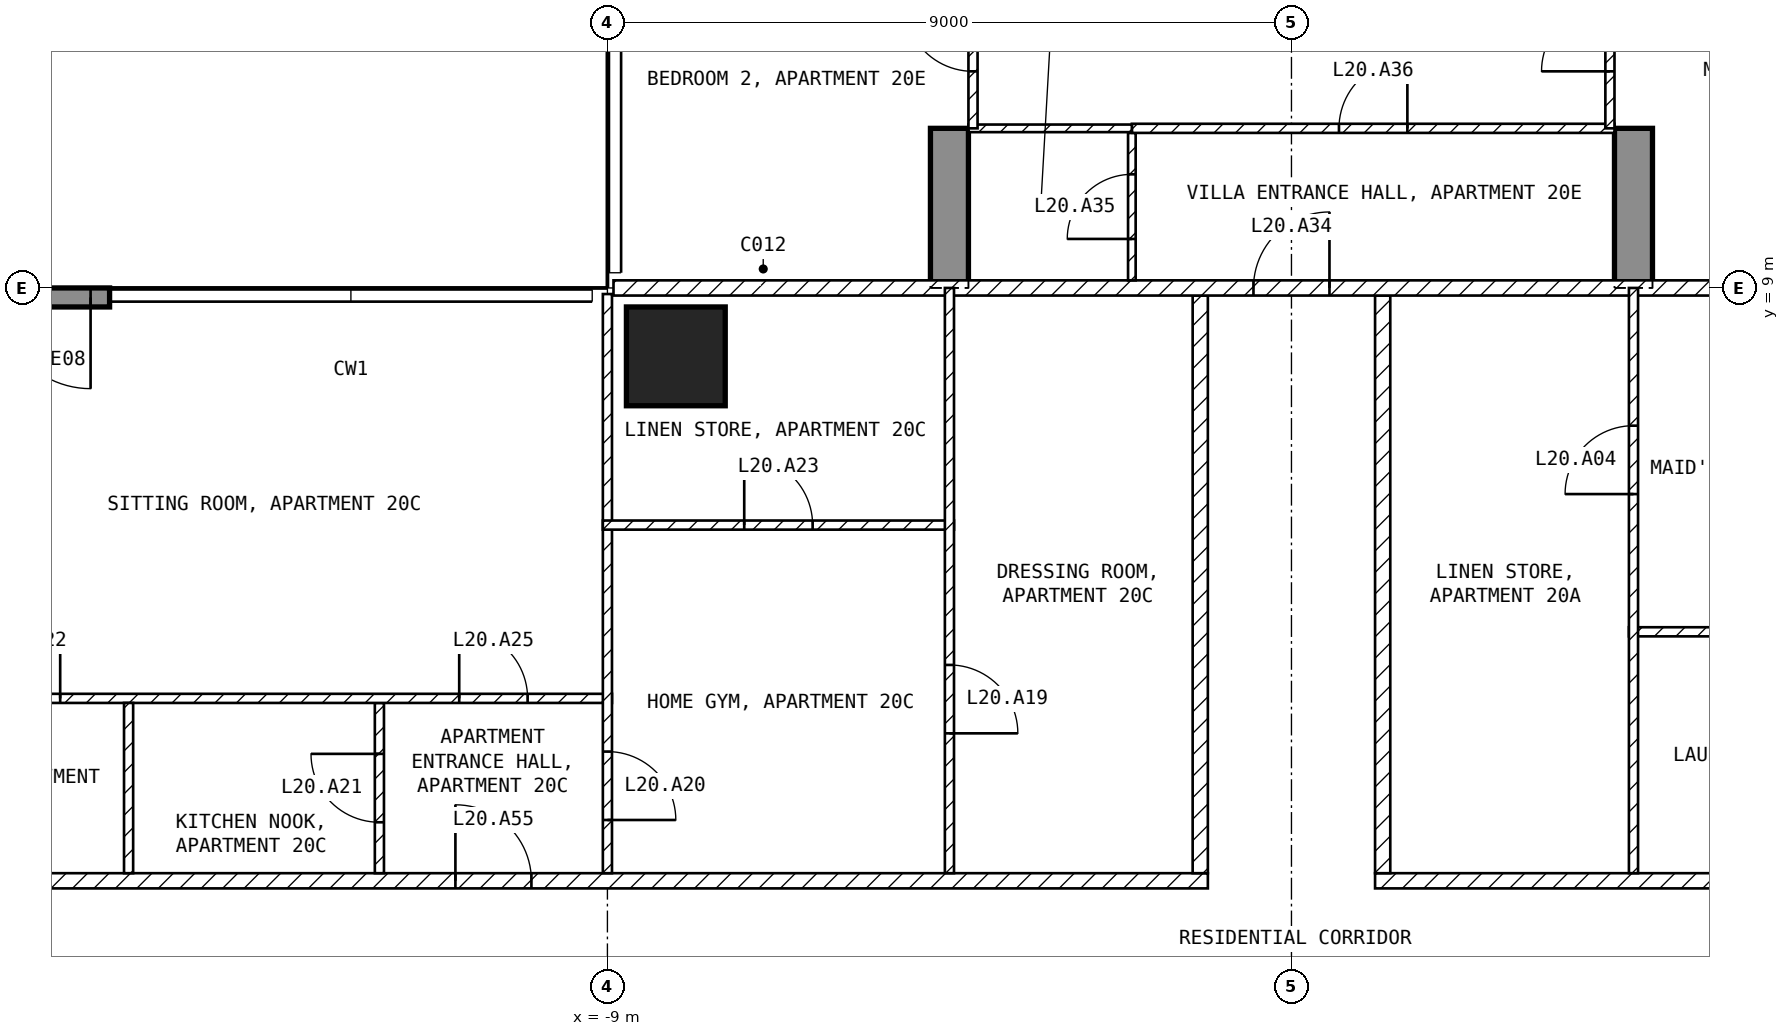
"""IFC4 building model, lengths in metres.
Left out: names, types, materials, properties, quantities, classifications, styles, units other than length and angle.
Written with IfcOpenShell. Run it as: python <this file> out.ifc"""

import sys

from ifc_helpers import new_model, si_unit, direction, frame, frame_2d, origin, origin_2d, place, context, subcontext, project, spatial, polyline, rectangle, outline, extrude, element, fill, save


model = new_model("IFC4")
c1 = context("Model", 3, precision=1e-05, world=origin(), true_north=direction((0.0, 1.0)))
c2 = subcontext(c1, "Body", "Model", "MODEL_VIEW")
j1 = project(units=[si_unit("LENGTHUNIT", "METRE"), si_unit("PLANEANGLEUNIT", "RADIAN")], contexts=[c1])
p1 = place(None, origin())
s1 = spatial("IfcSite", under=j1, at=p1, CompositionType="ELEMENT")
p2 = place(p1, origin())
s2 = spatial("IfcBuilding", under=s1, at=p2, CompositionType="ELEMENT")
p3 = place(p2, frame((0.0, 0.0, 89.0)))
s3 = spatial("IfcBuildingStorey", under=s2, at=p3, CompositionType="ELEMENT", Elevation=89.0)
p4 = place(p3, frame((-8.1, 8.1, -0.25), z_axis=(0.0, 0.0, 1.0), x_axis=(1.0, 0.0, 0.0)))
e1 = element("IfcColumn", 1, at=p4, inside=s3, PredefinedType="COLUMN", context=c2, shape_type="SweptSolid", body=[
    extrude(rectangle(XDim=1.3, YDim=1.3, at=origin_2d()), origin(), (0.0, 0.0, 1.0), 3.45),
])
for number, where, z_axis, x_axis in (
    (2, (-4.75, 9.0, -0.25), (1.0, 0.0, 0.0), (0.0, 1.0, 0.0)),
    (3, (4.25, 9.0, -0.25), (1.0, 0.0, 0.0), (0.0, 1.0, 0.0)),
):
    element("IfcWall", number, at=place(p3, frame(where, z_axis=z_axis, x_axis=x_axis)), inside=s3, PredefinedType="SHEAR", context=c2, shape_type="SweptSolid", body=[
        extrude(outline(polyline([(0.0, 0.0), (2.1, 0.0), (2.1, 2.65), (4.5, 2.65), (4.5, 0.0), (9.9, 0.0), (9.9, 2.65), (12.3, 2.65), (12.3, 0.0), (16.45, 0.0), (16.45, 3.45), (0.0, 3.45), (0.0, 0.0)])), origin(), (0.0, 0.0, 1.0), 0.5),
    ])
p5 = place(p3, frame((-15.55, 8.875, 0.0), z_axis=(0.0, 0.0, 1.0), x_axis=(-1.0, 0.0, 0.0)))
e4 = element("IfcWall", 4, at=p5, inside=s3, PredefinedType="SOLIDWALL", context=c2, shape_type="SweptSolid", body=[
    extrude(rectangle(XDim=2.65, YDim=0.25, at=frame_2d((1.325, 0.0))), origin(), (0.0, 0.0, 1.0), 3.2),
])
p6 = place(p5, frame((0.25, 0.0, 0.0)))
e5 = element("IfcOpeningElement", 5, at=p6, cuts=e4, PredefinedType="OPENING", context=c2, shape_type="SweptSolid", body=[
    extrude(rectangle(XDim=1.2, YDim=2.4, at=frame_2d((0.6, 1.2))), frame((0.0, 0.135, 0.0), z_axis=(0.0, -1.0, 0.0), x_axis=(1.0, 0.0, 0.0)), (0.0, 0.0, 1.0), 0.27),
])
p7 = place(p3, frame((1.1, 1.2, 0.0), z_axis=(0.0, 0.0, 1.0), x_axis=(1.0, 0.0, 0.0)))
e6 = element("IfcWall", 6, at=p7, inside=s3, PredefinedType="PARTITIONING", context=c2, shape_type="SweptSolid", body=[
    extrude(rectangle(XDim=20.5, YDim=0.2, at=frame_2d((10.25, 0.0))), origin(), (0.0, 0.0, 1.0), 3.2),
])
p8 = place(p7, frame((15.2, 0.0, 0.0)))
e7 = element("IfcOpeningElement", 7, at=p8, cuts=e6, PredefinedType="OPENING", context=c2, shape_type="SweptSolid", body=[
    extrude(rectangle(XDim=1.0, YDim=2.1, at=frame_2d((0.5, 1.05))), frame((0.0, 0.11, 0.0), z_axis=(0.0, -1.0, 0.0), x_axis=(1.0, 0.0, 0.0)), (0.0, 0.0, 1.0), 0.22),
])
p9 = place(p3, frame((1.2, 8.9, 0.0), z_axis=(0.0, 0.0, 1.0), x_axis=(0.0, -1.0, 0.0)))
e8 = element("IfcWall", 8, at=p9, inside=s3, PredefinedType="PARTITIONING", context=c2, shape_type="SweptSolid", body=[
    extrude(rectangle(XDim=7.6, YDim=0.2, at=frame_2d((3.8, 0.0))), origin(), (0.0, 0.0, 1.0), 3.2),
])
p10 = place(p3, frame((-21.6, 1.2, 0.0), z_axis=(0.0, 0.0, 1.0), x_axis=(1.0, 0.0, 0.0)))
e9 = element("IfcWall", 9, at=p10, inside=s3, PredefinedType="PARTITIONING", context=c2, shape_type="SweptSolid", body=[
    extrude(rectangle(XDim=20.5, YDim=0.2, at=frame_2d((10.25, 0.0))), origin(), (0.0, 0.0, 1.0), 3.2),
])
p11 = place(p10, frame((10.6, 0.0, 0.0)))
e10 = element("IfcOpeningElement", 10, at=p11, cuts=e9, PredefinedType="OPENING", context=c2, shape_type="SweptSolid", body=[
    extrude(rectangle(XDim=1.0, YDim=2.1, at=frame_2d((0.5, 1.05))), frame((0.0, 0.11, 0.0), z_axis=(0.0, -1.0, 0.0), x_axis=(1.0, 0.0, 0.0)), (0.0, 0.0, 1.0), 0.22),
])
p12 = place(p3, frame((-1.2, 1.3, 0.0), z_axis=(0.0, 0.0, 1.0), x_axis=(0.0, 1.0, 0.0)))
e11 = element("IfcWall", 11, at=p12, inside=s3, PredefinedType="PARTITIONING", context=c2, shape_type="SweptSolid", body=[
    extrude(rectangle(XDim=7.6, YDim=0.2, at=frame_2d((3.8, 0.0))), origin(), (0.0, 0.0, 1.0), 3.2),
])
p13 = place(p3, frame((-8.92, 9.0, 0.0), z_axis=(0.0, 0.0, 1.0), x_axis=(1.0, 0.0, 0.0)))
e12 = element("IfcWall", 12, at=p13, inside=s3, PredefinedType="PARTITIONING", context=c2, shape_type="SweptSolid", body=[
    extrude(rectangle(XDim=17.84, YDim=0.2, at=frame_2d((8.92, 0.0))), origin(), (0.0, 0.0, 1.0), 3.2),
])
p14 = place(p13, frame((8.42, 0.0, 0.0)))
e13 = element("IfcOpeningElement", 13, at=p14, cuts=e12, PredefinedType="OPENING", context=c2, shape_type="SweptSolid", body=[
    extrude(rectangle(XDim=1.0, YDim=2.1, at=frame_2d((0.5, 1.05))), frame((0.0, 0.11, 0.0), z_axis=(0.0, -1.0, 0.0), x_axis=(1.0, 0.0, 0.0)), (0.0, 0.0, 1.0), 0.22),
])
p15 = place(p3, frame((4.44, 4.476, 0.0), z_axis=(0.0, 0.0, 1.0), x_axis=(1.0, 0.0, 0.0)))
e14 = element("IfcWall", 14, at=p15, inside=s3, PredefinedType="PARTITIONING", context=c2, shape_type="SweptSolid", body=[
    extrude(rectangle(XDim=4.61, YDim=0.12, at=frame_2d((2.305, 0.0))), origin(), (0.0, 0.0, 1.0), 3.2),
])
p16 = place(p15, frame((1.86, 0.0, 0.0)))
e15 = element("IfcOpeningElement", 15, at=p16, cuts=e14, PredefinedType="OPENING", context=c2, shape_type="SweptSolid", body=[
    extrude(rectangle(XDim=0.9, YDim=2.1, at=frame_2d((0.45, 1.05))), frame((0.0, 0.07, 0.0), z_axis=(0.0, -1.0, 0.0), x_axis=(1.0, 0.0, 0.0)), (0.0, 0.0, 1.0), 0.14),
])
p17 = place(p3, frame((4.5, 1.3, 0.0), z_axis=(0.0, 0.0, 1.0), x_axis=(0.0, 1.0, 0.0)))
e16 = element("IfcWall", 16, at=p17, inside=s3, PredefinedType="PARTITIONING", context=c2, shape_type="SweptSolid", body=[
    extrude(rectangle(XDim=7.7, YDim=0.12, at=frame_2d((3.85, 0.0))), origin(), (0.0, 0.0, 1.0), 3.2),
])
p18 = place(p17, frame((4.988, 0.0, 0.0)))
e17 = element("IfcOpeningElement", 17, at=p18, cuts=e16, PredefinedType="OPENING", context=c2, shape_type="SweptSolid", body=[
    extrude(rectangle(XDim=0.9, YDim=2.1, at=frame_2d((0.45, 1.05))), frame((0.0, 0.07, 0.0), z_axis=(0.0, -1.0, 0.0), x_axis=(1.0, 0.0, 0.0)), (0.0, 0.0, 1.0), 0.14),
])
p19 = place(p3, frame((-12.0, 1.3, 0.0), z_axis=(0.0, 0.0, 1.0), x_axis=(0.0, 1.0, 0.0)))
e18 = element("IfcWall", 18, at=p19, inside=s3, PredefinedType="PARTITIONING", context=c2, shape_type="SweptSolid", body=[
    extrude(rectangle(XDim=2.24, YDim=0.12, at=frame_2d((1.12, 0.0))), origin(), (0.0, 0.0, 1.0), 3.2),
])
p20 = place(p19, frame((0.67, 0.0, 0.0)))
e19 = element("IfcOpeningElement", 19, at=p20, cuts=e18, PredefinedType="OPENING", context=c2, shape_type="SweptSolid", body=[
    extrude(rectangle(XDim=0.9, YDim=2.1, at=frame_2d((0.45, 1.05))), frame((0.0, 0.07, 0.0), z_axis=(0.0, -1.0, 0.0), x_axis=(1.0, 0.0, 0.0)), (0.0, 0.0, 1.0), 0.14),
])
p21 = place(p3, frame((-18.75, 3.6, 0.0), z_axis=(0.0, 0.0, 1.0), x_axis=(1.0, 0.0, 0.0)))
e20 = element("IfcWall", 20, at=p21, inside=s3, PredefinedType="PARTITIONING", context=c2, shape_type="SweptSolid", body=[
    extrude(rectangle(XDim=9.81, YDim=0.12, at=frame_2d((4.905, 0.0))), origin(), (0.0, 0.0, 1.0), 3.2),
])
p22 = place(p21, frame((1.65, 0.0, 0.0)))
e21 = element("IfcOpeningElement", 21, at=p22, cuts=e20, PredefinedType="OPENING", context=c2, shape_type="SweptSolid", body=[
    extrude(rectangle(XDim=0.9, YDim=2.1, at=frame_2d((0.45, 1.05))), frame((0.0, 0.07, 0.0), z_axis=(0.0, -1.0, 0.0), x_axis=(1.0, 0.0, 0.0)), (0.0, 0.0, 1.0), 0.14),
])
p23 = place(p21, frame((7.8, 0.0, 0.0)))
e22 = element("IfcOpeningElement", 22, at=p23, cuts=e20, PredefinedType="OPENING", context=c2, shape_type="SweptSolid", body=[
    extrude(rectangle(XDim=0.9, YDim=2.1, at=frame_2d((0.45, 1.05))), frame((0.0, 0.07, 0.0), z_axis=(0.0, -1.0, 0.0), x_axis=(1.0, 0.0, 0.0)), (0.0, 0.0, 1.0), 0.14),
])
p24 = place(p3, frame((-9.0, 8.92, 0.0), z_axis=(0.0, 0.0, 1.0), x_axis=(0.0, -1.0, 0.0)))
e23 = element("IfcWall", 23, at=p24, inside=s3, PredefinedType="PARTITIONING", context=c2, shape_type="SweptSolid", body=[
    extrude(rectangle(XDim=7.62, YDim=0.12, at=frame_2d((3.81, 0.0))), origin(), (0.0, 0.0, 1.0), 3.2),
])
p25 = place(p24, frame((6.02, 0.0, 0.0)))
e24 = element("IfcOpeningElement", 24, at=p25, cuts=e23, PredefinedType="OPENING", context=c2, shape_type="SweptSolid", body=[
    extrude(rectangle(XDim=0.9, YDim=2.1, at=frame_2d((0.45, 1.05))), frame((0.0, 0.07, 0.0), z_axis=(0.0, -1.0, 0.0), x_axis=(1.0, 0.0, 0.0)), (0.0, 0.0, 1.0), 0.14),
])
p26 = place(p3, frame((-15.3, 1.3, 0.0), z_axis=(0.0, 0.0, 1.0), x_axis=(0.0, 1.0, 0.0)))
e25 = element("IfcWall", 25, at=p26, inside=s3, PredefinedType="PARTITIONING", context=c2, shape_type="SweptSolid", body=[
    extrude(rectangle(XDim=2.24, YDim=0.12, at=frame_2d((1.12, 0.0))), origin(), (0.0, 0.0, 1.0), 3.2),
])
p27 = place(p3, frame((-9.06, 5.88, 0.0), z_axis=(0.0, 0.0, 1.0), x_axis=(1.0, 0.0, 0.0)))
e26 = element("IfcWall", 26, at=p27, inside=s3, PredefinedType="PARTITIONING", context=c2, shape_type="SweptSolid", body=[
    extrude(rectangle(XDim=4.62, YDim=0.12, at=frame_2d((2.31, 0.0))), origin(), (0.0, 0.0, 1.0), 3.2),
])
p28 = place(p27, frame((1.86, 0.0, 0.0)))
e27 = element("IfcOpeningElement", 27, at=p28, cuts=e26, PredefinedType="OPENING", context=c2, shape_type="SweptSolid", body=[
    extrude(rectangle(XDim=0.9, YDim=2.1, at=frame_2d((0.45, 1.05))), frame((0.0, 0.07, 0.0), z_axis=(0.0, -1.0, 0.0), x_axis=(1.0, 0.0, 0.0)), (0.0, 0.0, 1.0), 0.14),
])
p29 = place(p3, frame((-4.5, 9.0, 0.0), z_axis=(0.0, 0.0, 1.0), x_axis=(0.0, -1.0, 0.0)))
e28 = element("IfcWall", 28, at=p29, inside=s3, PredefinedType="PARTITIONING", context=c2, shape_type="SweptSolid", body=[
    extrude(rectangle(XDim=7.7, YDim=0.12, at=frame_2d((3.85, 0.0))), origin(), (0.0, 0.0, 1.0), 3.2),
])
p30 = place(p29, frame((4.96, 0.0, 0.0)))
e29 = element("IfcOpeningElement", 29, at=p30, cuts=e28, PredefinedType="OPENING", context=c2, shape_type="SweptSolid", body=[
    extrude(rectangle(XDim=0.9, YDim=2.1, at=frame_2d((0.45, 1.05))), frame((0.0, 0.07, 0.0), z_axis=(0.0, -1.0, 0.0), x_axis=(1.0, 0.0, 0.0)), (0.0, 0.0, 1.0), 0.14),
])
p31 = place(p3, frame((-2.1, 9.1, 0.0), z_axis=(0.0, 0.0, 1.0), x_axis=(0.0, 1.0, 0.0)))
e30 = element("IfcWall", 30, at=p31, inside=s3, PredefinedType="PARTITIONING", context=c2, shape_type="SweptSolid", body=[
    extrude(rectangle(XDim=1.94, YDim=0.1, at=frame_2d((0.97, 0.0))), origin(), (0.0, 0.0, 1.0), 3.2),
])
p32 = place(p31, frame((0.545, 0.0, 0.0)))
e31 = element("IfcOpeningElement", 31, at=p32, cuts=e30, PredefinedType="OPENING", context=c2, shape_type="SweptSolid", body=[
    extrude(rectangle(XDim=0.85, YDim=2.1, at=frame_2d((0.425, 1.05))), frame((0.0, 0.06, 0.0), z_axis=(0.0, -1.0, 0.0), x_axis=(1.0, 0.0, 0.0)), (0.0, 0.0, 1.0), 0.12),
])
p33 = place(p3, frame((-2.1, 11.1, 0.0), z_axis=(0.0, 0.0, 1.0), x_axis=(1.0, 0.0, 0.0)))
e32 = element("IfcWall", 32, at=p33, inside=s3, PredefinedType="PARTITIONING", context=c2, shape_type="SweptSolid", body=[
    extrude(rectangle(XDim=6.35, YDim=0.12, at=frame_2d((3.175, 0.0))), origin(), (0.0, 0.0, 1.0), 3.2),
])
p34 = place(p33, frame((2.725, 0.0, 0.0)))
e33 = element("IfcOpeningElement", 33, at=p34, cuts=e32, PredefinedType="OPENING", context=c2, shape_type="SweptSolid", body=[
    extrude(rectangle(XDim=0.9, YDim=2.1, at=frame_2d((0.45, 1.05))), frame((0.0, 0.07, 0.0), z_axis=(0.0, -1.0, 0.0), x_axis=(1.0, 0.0, 0.0)), (0.0, 0.0, 1.0), 0.14),
])
p35 = place(p3, frame((-4.25, 11.1, 0.0), z_axis=(0.0, 0.0, 1.0), x_axis=(1.0, 0.0, 0.0)))
e34 = element("IfcWall", 34, at=p35, inside=s3, PredefinedType="PARTITIONING", context=c2, shape_type="SweptSolid", body=[
    extrude(rectangle(XDim=2.15, YDim=0.1, at=frame_2d((1.075, 0.0))), origin(), (0.0, 0.0, 1.0), 3.2),
])
p36 = place(p3, frame((4.19, 11.1, 0.0), z_axis=(0.0, 0.0, 1.0), x_axis=(0.0, 1.0, 0.0)))
e35 = element("IfcWall", 35, at=p36, inside=s3, PredefinedType="PARTITIONING", context=c2, shape_type="SweptSolid", body=[
    extrude(rectangle(XDim=2.4, YDim=0.12, at=frame_2d((1.2, 0.0))), origin(), (0.0, 0.0, 1.0), 2.4),
])
p37 = place(p36, frame((0.75, 0.0, 0.0)))
e36 = element("IfcOpeningElement", 36, at=p37, cuts=e35, PredefinedType="OPENING", context=c2, shape_type="SweptSolid", body=[
    extrude(rectangle(XDim=0.9, YDim=2.1, at=frame_2d((0.45, 1.05))), frame((0.0, 0.07, 0.0), z_axis=(0.0, -1.0, 0.0), x_axis=(1.0, 0.0, 0.0)), (0.0, 0.0, 1.0), 0.14),
])
p38 = place(p3, frame((-4.19, 11.1, 0.0), z_axis=(0.0, 0.0, 1.0), x_axis=(0.0, 1.0, 0.0)))
e37 = element("IfcWall", 37, at=p38, inside=s3, PredefinedType="PARTITIONING", context=c2, shape_type="SweptSolid", body=[
    extrude(rectangle(XDim=2.4, YDim=0.12, at=frame_2d((1.2, 0.0))), origin(), (0.0, 0.0, 1.0), 2.4),
])
p39 = place(p38, frame((0.75, 0.0, 0.0)))
e38 = element("IfcOpeningElement", 38, at=p39, cuts=e37, PredefinedType="OPENING", context=c2, shape_type="SweptSolid", body=[
    extrude(rectangle(XDim=0.9, YDim=2.1, at=frame_2d((0.45, 1.05))), frame((0.0, 0.07, 0.0), z_axis=(0.0, -1.0, 0.0), x_axis=(1.0, 0.0, 0.0)), (0.0, 0.0, 1.0), 0.14),
])
p40 = place(p6, origin())
e39 = element("IfcDoor", 39, at=p40, inside=s3, OperationType="SINGLE_SWING_LEFT", PredefinedType="DOOR", context=c2, shape_type="SweptSolid", body=[
    extrude(rectangle(XDim=1.2, YDim=2.4, at=frame_2d((0.6, 1.2))), frame((0.0, 0.025, 0.0), z_axis=(0.0, -1.0, 0.0), x_axis=(1.0, 0.0, 0.0)), (0.0, 0.0, 1.0), 0.05),
])
fill(e5, e39)
p41 = place(p18, origin())
e40 = element("IfcDoor", 40, at=p41, inside=s3, OperationType="SINGLE_SWING_LEFT", PredefinedType="DOOR", context=c2, shape_type="SweptSolid", body=[
    extrude(rectangle(XDim=0.9, YDim=2.1, at=frame_2d((0.45, 1.05))), frame((0.0, 0.025, 0.0), z_axis=(0.0, -1.0, 0.0), x_axis=(1.0, 0.0, 0.0)), (0.0, 0.0, 1.0), 0.05),
])
fill(e17, e40)
p42 = place(p30, origin())
e41 = element("IfcDoor", 41, at=p42, inside=s3, OperationType="SINGLE_SWING_RIGHT", PredefinedType="DOOR", context=c2, shape_type="SweptSolid", body=[
    extrude(rectangle(XDim=0.9, YDim=2.1, at=frame_2d((0.45, 1.05))), frame((0.0, 0.025, 0.0), z_axis=(0.0, -1.0, 0.0), x_axis=(1.0, 0.0, 0.0)), (0.0, 0.0, 1.0), 0.05),
])
fill(e29, e41)
p43 = place(p25, origin())
e42 = element("IfcDoor", 42, at=p43, inside=s3, OperationType="SINGLE_SWING_RIGHT", PredefinedType="DOOR", context=c2, shape_type="SweptSolid", body=[
    extrude(rectangle(XDim=0.9, YDim=2.1, at=frame_2d((0.45, 1.05))), frame((0.0, 0.025, 0.0), z_axis=(0.0, -1.0, 0.0), x_axis=(1.0, 0.0, 0.0)), (0.0, 0.0, 1.0), 0.05),
])
fill(e24, e42)
p44 = place(p20, origin())
e43 = element("IfcDoor", 43, at=p44, inside=s3, OperationType="SINGLE_SWING_RIGHT", PredefinedType="DOOR", context=c2, shape_type="SweptSolid", body=[
    extrude(rectangle(XDim=0.9, YDim=2.1, at=frame_2d((0.45, 1.05))), frame((0.0, 0.025, 0.0), z_axis=(0.0, -1.0, 0.0), x_axis=(1.0, 0.0, 0.0)), (0.0, 0.0, 1.0), 0.05),
])
fill(e19, e43)
p45 = place(p22, origin())
e44 = element("IfcDoor", 44, at=p45, inside=s3, OperationType="SINGLE_SWING_RIGHT", PredefinedType="DOOR", context=c2, shape_type="SweptSolid", body=[
    extrude(rectangle(XDim=0.9, YDim=2.1, at=frame_2d((0.45, 1.05))), frame((0.0, 0.025, 0.0), z_axis=(0.0, -1.0, 0.0), x_axis=(1.0, 0.0, 0.0)), (0.0, 0.0, 1.0), 0.05),
])
fill(e21, e44)
p46 = place(p28, origin())
e45 = element("IfcDoor", 45, at=p46, inside=s3, OperationType="SINGLE_SWING_LEFT", PredefinedType="DOOR", context=c2, shape_type="SweptSolid", body=[
    extrude(rectangle(XDim=0.9, YDim=2.1, at=frame_2d((0.45, 1.05))), frame((0.0, 0.025, 0.0), z_axis=(0.0, -1.0, 0.0), x_axis=(1.0, 0.0, 0.0)), (0.0, 0.0, 1.0), 0.05),
])
fill(e27, e45)
p47 = place(p23, origin())
e46 = element("IfcDoor", 46, at=p47, inside=s3, OperationType="SINGLE_SWING_LEFT", PredefinedType="DOOR", context=c2, shape_type="SweptSolid", body=[
    extrude(rectangle(XDim=0.9, YDim=2.1, at=frame_2d((0.45, 1.05))), frame((0.0, 0.025, 0.0), z_axis=(0.0, -1.0, 0.0), x_axis=(1.0, 0.0, 0.0)), (0.0, 0.0, 1.0), 0.05),
])
fill(e22, e46)
p48 = place(p14, origin())
e47 = element("IfcDoor", 47, at=p48, inside=s3, OperationType="SINGLE_SWING_RIGHT", PredefinedType="DOOR", context=c2, shape_type="SweptSolid", body=[
    extrude(rectangle(XDim=1.0, YDim=2.1, at=frame_2d((0.5, 1.05))), frame((0.0, 0.025, 0.0), z_axis=(0.0, -1.0, 0.0), x_axis=(1.0, 0.0, 0.0)), (0.0, 0.0, 1.0), 0.05),
])
fill(e13, e47)
p49 = place(p32, origin())
e48 = element("IfcDoor", 48, at=p49, inside=s3, OperationType="SINGLE_SWING_LEFT", PredefinedType="DOOR", context=c2, shape_type="SweptSolid", body=[
    extrude(rectangle(XDim=0.85, YDim=2.1, at=frame_2d((0.425, 1.05))), frame((0.0, 0.025, 0.0), z_axis=(0.0, -1.0, 0.0), x_axis=(1.0, 0.0, 0.0)), (0.0, 0.0, 1.0), 0.05),
])
fill(e31, e48)
p50 = place(p34, origin())
e49 = element("IfcDoor", 49, at=p50, inside=s3, OperationType="SINGLE_SWING_RIGHT", PredefinedType="DOOR", context=c2, shape_type="SweptSolid", body=[
    extrude(rectangle(XDim=0.9, YDim=2.1, at=frame_2d((0.45, 1.05))), frame((0.0, 0.025, 0.0), z_axis=(0.0, -1.0, 0.0), x_axis=(1.0, 0.0, 0.0)), (0.0, 0.0, 1.0), 0.05),
])
fill(e33, e49)
p51 = place(p11, origin())
e50 = element("IfcDoor", 50, at=p51, inside=s3, OperationType="SINGLE_SWING_LEFT", PredefinedType="DOOR", context=c2, shape_type="SweptSolid", body=[
    extrude(rectangle(XDim=1.0, YDim=2.1, at=frame_2d((0.5, 1.05))), frame((0.0, 0.025, 0.0), z_axis=(0.0, -1.0, 0.0), x_axis=(1.0, 0.0, 0.0)), (0.0, 0.0, 1.0), 0.05),
])
fill(e10, e50)
p52 = place(p37, origin())
e51 = element("IfcDoor", 51, at=p52, inside=s3, OperationType="SINGLE_SWING_LEFT", PredefinedType="DOOR", context=c2, shape_type="SweptSolid", body=[
    extrude(rectangle(XDim=0.9, YDim=2.1, at=frame_2d((0.45, 1.05))), frame((0.0, 0.025, 0.0), z_axis=(0.0, -1.0, 0.0), x_axis=(1.0, 0.0, 0.0)), (0.0, 0.0, 1.0), 0.05),
])
fill(e36, e51)
p53 = place(p39, origin())
e52 = element("IfcDoor", 52, at=p53, inside=s3, OperationType="SINGLE_SWING_RIGHT", PredefinedType="DOOR", context=c2, shape_type="SweptSolid", body=[
    extrude(rectangle(XDim=0.9, YDim=2.1, at=frame_2d((0.45, 1.05))), frame((0.0, 0.025, 0.0), z_axis=(0.0, -1.0, 0.0), x_axis=(1.0, 0.0, 0.0)), (0.0, 0.0, 1.0), 0.05),
])
fill(e38, e52)
save(model, sys.argv[1])
